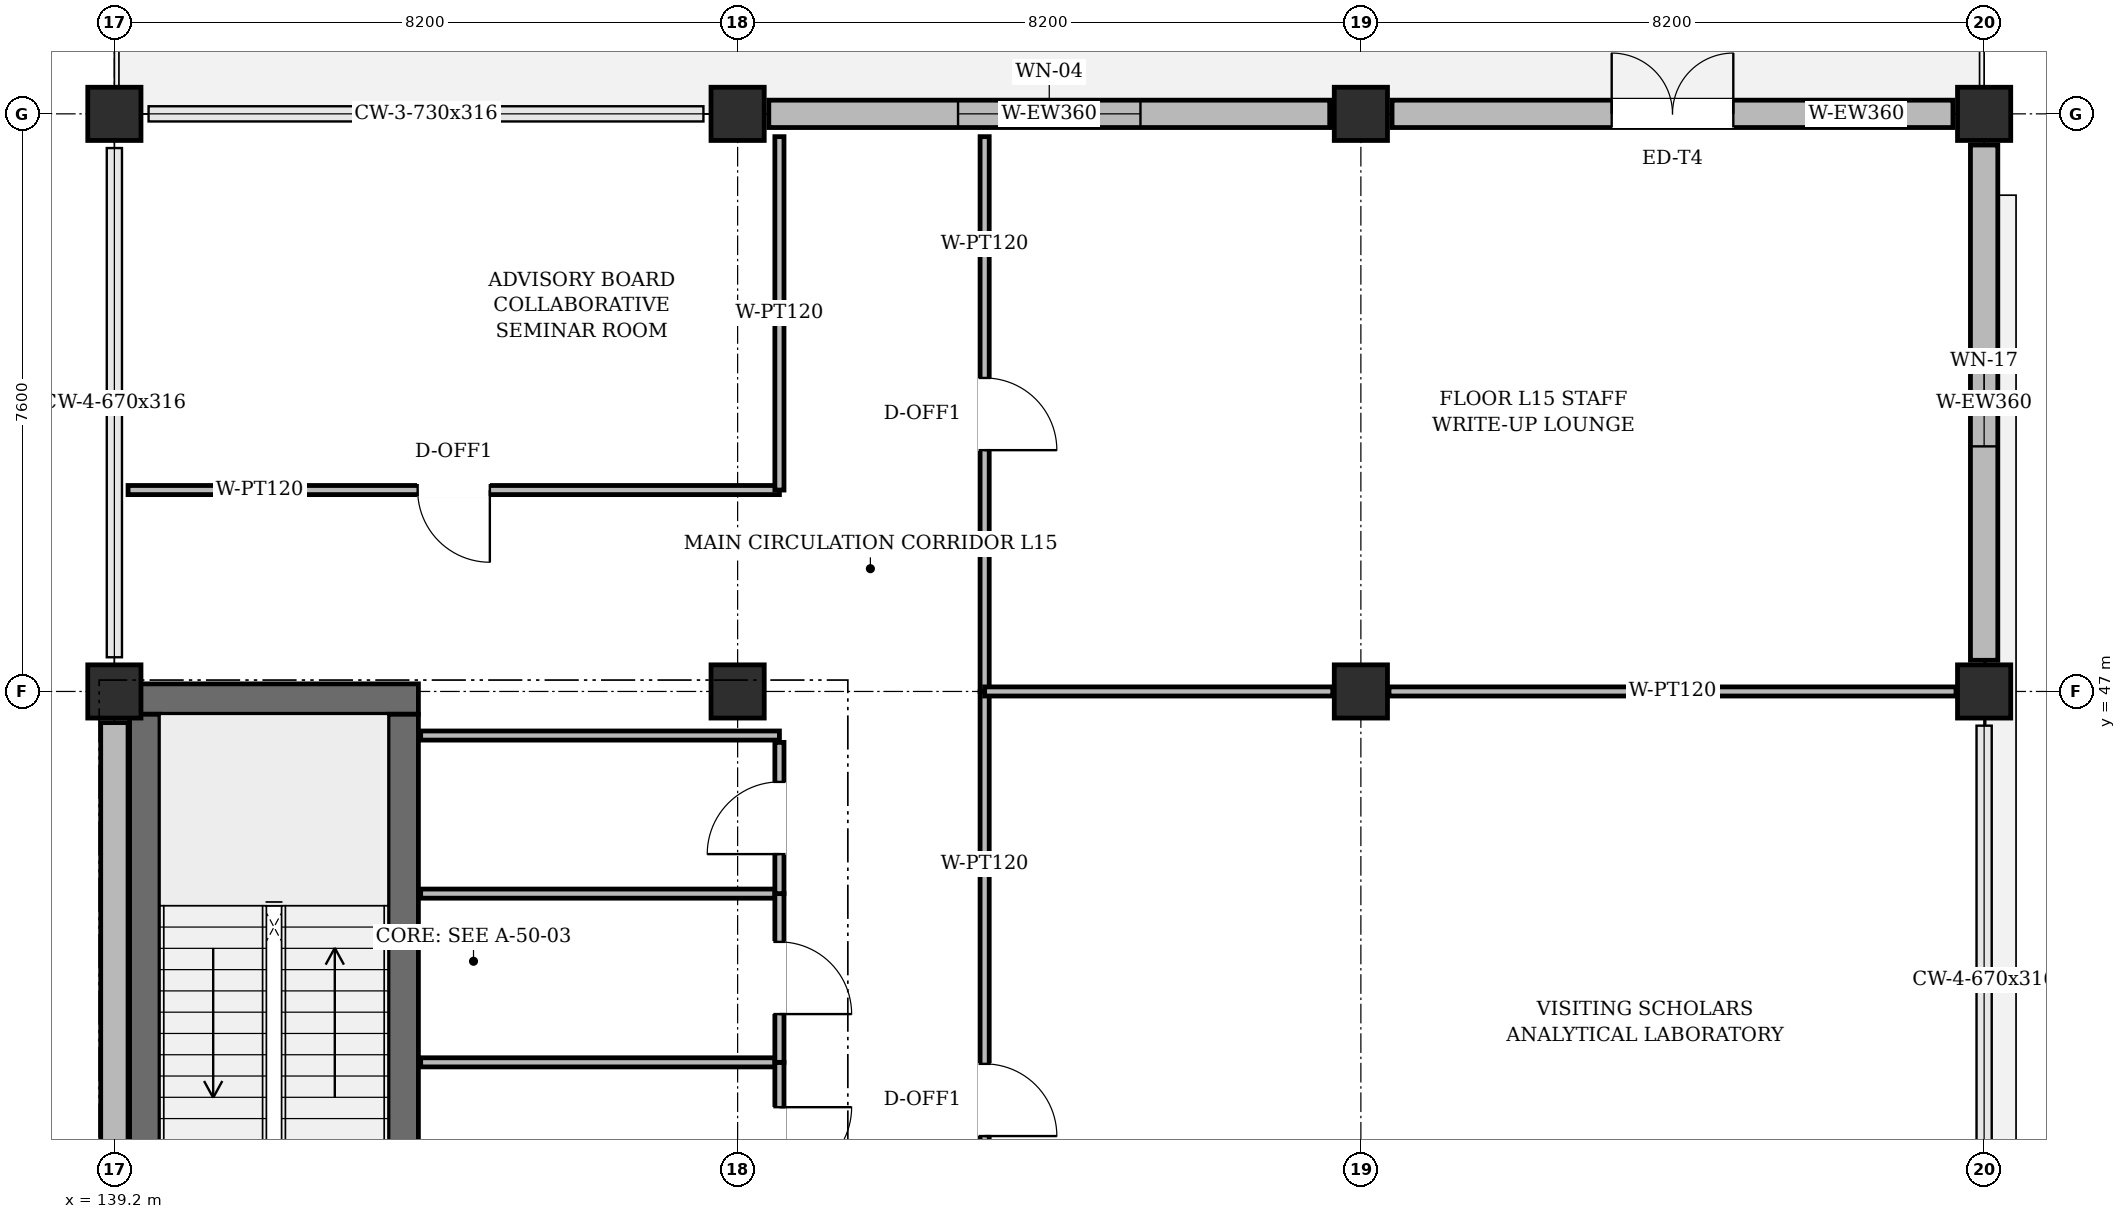
"""IFC4 building model, lengths in metres.
Left out: names, types, materials, properties, quantities, classifications, styles, units other than length and angle.
Written with IfcOpenShell. Run it as: python <this file> out.ifc"""

import sys

from ifc_helpers import new_model, si_unit, direction, frame, frame_2d, origin, origin_2d, place, context, subcontext, project, spatial, rectangle, extrude, element, fill, save


model = new_model("IFC4")
c1 = context("Model", 3, precision=1e-05, world=origin(), true_north=direction((0.0, 1.0)))
c2 = subcontext(c1, "Body", "Model", "MODEL_VIEW")
j1 = project(units=[si_unit("LENGTHUNIT", "METRE"), si_unit("PLANEANGLEUNIT", "RADIAN")], contexts=[c1])
p1 = place(None, origin())
s1 = spatial("IfcSite", under=j1, at=p1, CompositionType="ELEMENT")
p2 = place(p1, origin())
s2 = spatial("IfcBuilding", under=s1, at=p2, CompositionType="ELEMENT")
p3 = place(p2, frame((0.0, 0.0, 66.2)))
s3 = spatial("IfcBuildingStorey", under=s2, at=p3, CompositionType="ELEMENT", Elevation=66.2)
for number, where, z_axis, x_axis in (
    (1, (139.2, 47.0, 0.0), (0.0, 0.0, 1.0), (1.0, 0.0, 0.0)),
    (2, (139.2, 54.6, 0.0), (0.0, 0.0, 1.0), (1.0, 0.0, 0.0)),
    (3, (147.4, 47.0, 0.0), (0.0, 0.0, 1.0), (1.0, 0.0, 0.0)),
    (4, (147.4, 54.6, 0.0), (0.0, 0.0, 1.0), (1.0, 0.0, 0.0)),
    (5, (155.6, 47.0, 0.0), (0.0, 0.0, 1.0), (1.0, 0.0, 0.0)),
    (6, (155.6, 54.6, 0.0), (0.0, 0.0, 1.0), (1.0, 0.0, 0.0)),
    (7, (163.8, 47.0, 0.0), (0.0, 0.0, 1.0), (1.0, 0.0, 0.0)),
    (8, (163.8, 54.6, 0.0), (0.0, 0.0, 1.0), (1.0, 0.0, 0.0)),
):
    element("IfcColumn", number, at=place(p3, frame(where, z_axis=z_axis, x_axis=x_axis)), inside=s3, PredefinedType="COLUMN", context=c2, shape_type="SweptSolid", body=[
        extrude(rectangle(XDim=0.7, YDim=0.7, at=origin_2d()), origin(), (0.0, 0.0, 1.0), 3.76),
    ])
p4 = place(p3, frame((163.8, 47.41, 0.0), z_axis=(0.0, 0.0, 1.0), x_axis=(0.0, 1.0, 0.0)))
e9 = element("IfcWall", 9, at=p4, inside=s3, PredefinedType="SOLIDWALL", context=c2, shape_type="SweptSolid", body=[
    extrude(rectangle(XDim=6.78, YDim=0.36, at=frame_2d((3.39, 0.0))), origin(), (0.0, 0.0, 1.0), 3.145),
])
p5 = place(p4, frame((2.815, 0.0, 0.95)))
e10 = element("IfcOpeningElement", 10, at=p5, cuts=e9, PredefinedType="OPENING", context=c2, shape_type="SweptSolid", body=[
    extrude(rectangle(XDim=1.15, YDim=1.25, at=frame_2d((0.575, 0.625))), frame((0.0, 0.192, 0.0), z_axis=(0.0, -1.0, 0.0), x_axis=(1.0, 0.0, 0.0)), (0.0, 0.0, 1.0), 0.384),
])
p6 = place(p3, frame((163.39, 54.6, 0.0), z_axis=(0.0, 0.0, 1.0), x_axis=(-1.0, 0.0, 0.0)))
e11 = element("IfcWall", 11, at=p6, inside=s3, PredefinedType="SOLIDWALL", context=c2, shape_type="SweptSolid", body=[
    extrude(rectangle(XDim=7.38, YDim=0.36, at=frame_2d((3.69, 0.0))), origin(), (0.0, 0.0, 1.0), 3.145),
])
p7 = place(p6, frame((2.89, 0.0, 0.0)))
e12 = element("IfcOpeningElement", 12, at=p7, cuts=e11, PredefinedType="OPENING", context=c2, shape_type="SweptSolid", body=[
    extrude(rectangle(XDim=1.6, YDim=2.2, at=frame_2d((0.8, 1.1))), frame((0.0, 0.192, 0.0), z_axis=(0.0, -1.0, 0.0), x_axis=(1.0, 0.0, 0.0)), (0.0, 0.0, 1.0), 0.384),
])
p8 = place(p3, frame((155.19, 54.6, 0.0), z_axis=(0.0, 0.0, 1.0), x_axis=(-1.0, 0.0, 0.0)))
e13 = element("IfcWall", 13, at=p8, inside=s3, PredefinedType="SOLIDWALL", context=c2, shape_type="SweptSolid", body=[
    extrude(rectangle(XDim=7.38, YDim=0.36, at=frame_2d((3.69, 0.0))), origin(), (0.0, 0.0, 1.0), 3.145),
])
p9 = place(p8, frame((2.49, 0.0, 0.75)))
e14 = element("IfcOpeningElement", 14, at=p9, cuts=e13, PredefinedType="OPENING", context=c2, shape_type="SweptSolid", body=[
    extrude(rectangle(XDim=2.4, YDim=2.1, at=frame_2d((1.2, 1.05))), frame((0.0, 0.192, 0.0), z_axis=(0.0, -1.0, 0.0), x_axis=(1.0, 0.0, 0.0)), (0.0, 0.0, 1.0), 0.384),
])
p10 = place(p3, frame((139.2, 46.59, 0.0), z_axis=(0.0, 0.0, 1.0), x_axis=(0.0, -1.0, 0.0)))
e15 = element("IfcWall", 15, at=p10, inside=s3, PredefinedType="SOLIDWALL", context=c2, shape_type="SweptSolid", body=[
    extrude(rectangle(XDim=6.78, YDim=0.36, at=frame_2d((3.39, 0.0))), origin(), (0.0, 0.0, 1.0), 3.145),
])
p11 = place(p3, frame((139.4, 46.9, 0.0), z_axis=(0.0, 0.0, 1.0), x_axis=(1.0, 0.0, 0.0)))
e16 = element("IfcWall", 16, at=p11, inside=s3, PredefinedType="SHEAR", context=c2, shape_type="SweptSolid", body=[
    extrude(rectangle(XDim=3.8, YDim=0.4, at=frame_2d((1.9, 0.0))), origin(), (0.0, 0.0, 1.0), 3.76),
])
for number, where, z_axis, x_axis in (
    (17, (139.6, 39.7, 0.0), (0.0, 0.0, 1.0), (0.0, 1.0, 0.0)),
    (18, (143.0, 39.7, 0.0), (0.0, 0.0, 1.0), (0.0, 1.0, 0.0)),
):
    element("IfcWall", number, at=place(p3, frame(where, z_axis=z_axis, x_axis=x_axis)), inside=s3, PredefinedType="SHEAR", context=c2, shape_type="SweptSolid", body=[
        extrude(rectangle(XDim=7.0, YDim=0.4, at=frame_2d((3.5, 0.0))), origin(), (0.0, 0.0, 1.0), 3.76),
    ])
p12 = place(p3, frame((143.23, 46.42, 0.0), z_axis=(0.0, 0.0, 1.0), x_axis=(1.0, 0.0, 0.0)))
e19 = element("IfcWall", 19, at=p12, inside=s3, PredefinedType="PARTITIONING", context=c2, shape_type="SweptSolid", body=[
    extrude(rectangle(XDim=4.72, YDim=0.12, at=frame_2d((2.36, 0.0))), origin(), (0.0, 0.0, 1.0), 3.605),
])
p13 = place(p3, frame((143.23, 42.12, 0.0), z_axis=(0.0, 0.0, 1.0), x_axis=(1.0, 0.0, 0.0)))
e20 = element("IfcWall", 20, at=p13, inside=s3, PredefinedType="PARTITIONING", context=c2, shape_type="SweptSolid", body=[
    extrude(rectangle(XDim=4.72, YDim=0.12, at=frame_2d((2.36, 0.0))), origin(), (0.0, 0.0, 1.0), 3.235),
])
p14 = place(p3, frame((147.95, 42.12, 0.0), z_axis=(0.0, 0.0, 1.0), x_axis=(0.0, -1.0, 0.0)))
e21 = element("IfcWall", 21, at=p14, inside=s3, PredefinedType="PARTITIONING", context=c2, shape_type="SweptSolid", body=[
    extrude(rectangle(XDim=2.13, YDim=0.12, at=frame_2d((1.065, 0.0))), origin(), (0.0, 0.0, 1.0), 3.605),
])
p15 = place(p14, frame((0.59, 0.0, 0.0)))
e22 = element("IfcOpeningElement", 22, at=p15, cuts=e21, PredefinedType="OPENING", context=c2, shape_type="SweptSolid", body=[
    extrude(rectangle(XDim=0.95, YDim=2.15, at=frame_2d((0.475, 1.075))), frame((0.0, 0.072, 0.0), z_axis=(0.0, -1.0, 0.0), x_axis=(1.0, 0.0, 0.0)), (0.0, 0.0, 1.0), 0.144),
])
p16 = place(p3, frame((143.23, 44.34, 0.0), z_axis=(0.0, 0.0, 1.0), x_axis=(1.0, 0.0, 0.0)))
e23 = element("IfcWall", 23, at=p16, inside=s3, PredefinedType="PARTITIONING", context=c2, shape_type="SweptSolid", body=[
    extrude(rectangle(XDim=4.72, YDim=0.12, at=frame_2d((2.36, 0.0))), origin(), (0.0, 0.0, 1.0), 3.185),
])
p17 = place(p3, frame((147.95, 44.34, 0.0), z_axis=(0.0, 0.0, 1.0), x_axis=(0.0, -1.0, 0.0)))
e24 = element("IfcWall", 24, at=p17, inside=s3, PredefinedType="PARTITIONING", context=c2, shape_type="SweptSolid", body=[
    extrude(rectangle(XDim=2.22, YDim=0.12, at=frame_2d((1.11, 0.0))), origin(), (0.0, 0.0, 1.0), 3.605),
])
p18 = place(p17, frame((0.635, 0.0, 0.0)))
e25 = element("IfcOpeningElement", 25, at=p18, cuts=e24, PredefinedType="OPENING", context=c2, shape_type="SweptSolid", body=[
    extrude(rectangle(XDim=0.95, YDim=2.15, at=frame_2d((0.475, 1.075))), frame((0.0, 0.072, 0.0), z_axis=(0.0, -1.0, 0.0), x_axis=(1.0, 0.0, 0.0)), (0.0, 0.0, 1.0), 0.144),
])
p19 = place(p3, frame((147.95, 46.33, 0.0), z_axis=(0.0, 0.0, 1.0), x_axis=(0.0, -1.0, 0.0)))
e26 = element("IfcWall", 26, at=p19, inside=s3, PredefinedType="PARTITIONING", context=c2, shape_type="SweptSolid", body=[
    extrude(rectangle(XDim=1.99, YDim=0.12, at=frame_2d((0.995, 0.0))), origin(), (0.0, 0.0, 1.0), 3.605),
])
p20 = place(p19, frame((0.52, 0.0, 0.0)))
e27 = element("IfcOpeningElement", 27, at=p20, cuts=e26, PredefinedType="OPENING", context=c2, shape_type="SweptSolid", body=[
    extrude(rectangle(XDim=0.95, YDim=2.15, at=frame_2d((0.475, 1.075))), frame((0.0, 0.072, 0.0), z_axis=(0.0, -1.0, 0.0), x_axis=(1.0, 0.0, 0.0)), (0.0, 0.0, 1.0), 0.144),
])
p21 = place(p3, frame((150.65, 47.0, 0.0), z_axis=(0.0, 0.0, 1.0), x_axis=(0.0, -1.0, 0.0)))
e28 = element("IfcWall", 28, at=p21, inside=s3, PredefinedType="PARTITIONING", context=c2, shape_type="SweptSolid", body=[
    extrude(rectangle(XDim=10.75, YDim=0.12, at=frame_2d((5.375, 0.0))), origin(), (0.0, 0.0, 1.0), 3.605),
])
p22 = place(p21, frame((4.9, 0.0, 0.0)))
e29 = element("IfcOpeningElement", 29, at=p22, cuts=e28, PredefinedType="OPENING", context=c2, shape_type="SweptSolid", body=[
    extrude(rectangle(XDim=0.95, YDim=2.2, at=frame_2d((0.475, 1.1))), frame((0.0, 0.072, 0.0), z_axis=(0.0, -1.0, 0.0), x_axis=(1.0, 0.0, 0.0)), (0.0, 0.0, 1.0), 0.144),
])
p23 = place(p3, frame((139.38, 49.65, 0.0), z_axis=(0.0, 0.0, 1.0), x_axis=(1.0, 0.0, 0.0)))
e30 = element("IfcWall", 30, at=p23, inside=s3, PredefinedType="PARTITIONING", context=c2, shape_type="SweptSolid", body=[
    extrude(rectangle(XDim=8.57, YDim=0.12, at=frame_2d((4.285, 0.0))), origin(), (0.0, 0.0, 1.0), 3.185),
])
p24 = place(p23, frame((3.81, 0.0, 0.0)))
e31 = element("IfcOpeningElement", 31, at=p24, cuts=e30, PredefinedType="OPENING", context=c2, shape_type="SweptSolid", body=[
    extrude(rectangle(XDim=0.95, YDim=2.2, at=frame_2d((0.475, 1.1))), frame((0.0, 0.072, 0.0), z_axis=(0.0, -1.0, 0.0), x_axis=(1.0, 0.0, 0.0)), (0.0, 0.0, 1.0), 0.144),
])
p25 = place(p3, frame((147.95, 49.65, 0.0), z_axis=(0.0, 0.0, 1.0), x_axis=(0.0, 1.0, 0.0)))
e32 = element("IfcWall", 32, at=p25, inside=s3, PredefinedType="PARTITIONING", context=c2, shape_type="SweptSolid", body=[
    extrude(rectangle(XDim=4.65, YDim=0.12, at=frame_2d((2.325, 0.0))), origin(), (0.0, 0.0, 1.0), 3.605),
])
p26 = place(p3, frame((150.65, 54.3, 0.0), z_axis=(0.0, 0.0, 1.0), x_axis=(0.0, -1.0, 0.0)))
e33 = element("IfcWall", 33, at=p26, inside=s3, PredefinedType="PARTITIONING", context=c2, shape_type="SweptSolid", body=[
    extrude(rectangle(XDim=7.3, YDim=0.12, at=frame_2d((3.65, 0.0))), origin(), (0.0, 0.0, 1.0), 3.605),
])
p27 = place(p26, frame((3.175, 0.0, 0.0)))
e34 = element("IfcOpeningElement", 34, at=p27, cuts=e33, PredefinedType="OPENING", context=c2, shape_type="SweptSolid", body=[
    extrude(rectangle(XDim=0.95, YDim=2.2, at=frame_2d((0.475, 1.1))), frame((0.0, 0.072, 0.0), z_axis=(0.0, -1.0, 0.0), x_axis=(1.0, 0.0, 0.0)), (0.0, 0.0, 1.0), 0.144),
])
p28 = place(p3, frame((150.65, 47.0, 0.0), z_axis=(0.0, 0.0, 1.0), x_axis=(1.0, 0.0, 0.0)))
e35 = element("IfcWall", 35, at=p28, inside=s3, PredefinedType="PARTITIONING", context=c2, shape_type="SweptSolid", body=[
    extrude(rectangle(XDim=4.58, YDim=0.12, at=frame_2d((2.29, 0.0))), origin(), (0.0, 0.0, 1.0), 3.095),
])
p29 = place(p3, frame((155.97, 47.0, 0.0), z_axis=(0.0, 0.0, 1.0), x_axis=(1.0, 0.0, 0.0)))
e36 = element("IfcWall", 36, at=p29, inside=s3, PredefinedType="PARTITIONING", context=c2, shape_type="SweptSolid", body=[
    extrude(rectangle(XDim=7.46, YDim=0.12, at=frame_2d((3.73, 0.0))), origin(), (0.0, 0.0, 1.0), 3.095),
])
p30 = place(p5, origin())
e37 = element("IfcWindow", 37, at=p30, inside=s3, PartitioningType="SINGLE_PANEL", PredefinedType="WINDOW", context=c2, shape_type="SweptSolid", body=[
    extrude(rectangle(XDim=1.15, YDim=1.25, at=frame_2d((0.575, 0.625))), frame((0.0, 0.03, 0.0), z_axis=(0.0, -1.0, 0.0), x_axis=(1.0, 0.0, 0.0)), (0.0, 0.0, 1.0), 0.06),
])
fill(e10, e37)
p31 = place(p7, frame((1.6, 0.0, 0.0), z_axis=(0.0, 0.0, 1.0), x_axis=(-1.0, 0.0, 0.0)))
e38 = element("IfcDoor", 38, at=p31, inside=s3, OperationType="DOUBLE_DOOR_SINGLE_SWING", PredefinedType="DOOR", context=c2, shape_type="SweptSolid", body=[
    extrude(rectangle(XDim=1.6, YDim=2.2, at=frame_2d((0.8, 1.1))), frame((0.0, 0.025, 0.0), z_axis=(0.0, -1.0, 0.0), x_axis=(1.0, 0.0, 0.0)), (0.0, 0.0, 1.0), 0.05),
])
fill(e12, e38)
p32 = place(p9, origin())
e39 = element("IfcWindow", 39, at=p32, inside=s3, PartitioningType="TRIPLE_PANEL_VERTICAL", PredefinedType="WINDOW", context=c2, shape_type="SweptSolid", body=[
    extrude(rectangle(XDim=2.4, YDim=2.1, at=frame_2d((1.2, 1.05))), frame((0.0, 0.03, 0.0), z_axis=(0.0, -1.0, 0.0), x_axis=(1.0, 0.0, 0.0)), (0.0, 0.0, 1.0), 0.06),
])
fill(e14, e39)
p33 = place(p15, origin())
e40 = element("IfcDoor", 40, at=p33, inside=s3, OperationType="SINGLE_SWING_LEFT", PredefinedType="DOOR", context=c2, shape_type="SweptSolid", body=[
    extrude(rectangle(XDim=0.95, YDim=2.15, at=frame_2d((0.475, 1.075))), frame((0.0, 0.025, 0.0), z_axis=(0.0, -1.0, 0.0), x_axis=(1.0, 0.0, 0.0)), (0.0, 0.0, 1.0), 0.05),
])
fill(e22, e40)
p34 = place(p18, origin())
e41 = element("IfcDoor", 41, at=p34, inside=s3, OperationType="SINGLE_SWING_RIGHT", PredefinedType="DOOR", context=c2, shape_type="SweptSolid", body=[
    extrude(rectangle(XDim=0.95, YDim=2.15, at=frame_2d((0.475, 1.075))), frame((0.0, 0.025, 0.0), z_axis=(0.0, -1.0, 0.0), x_axis=(1.0, 0.0, 0.0)), (0.0, 0.0, 1.0), 0.05),
])
fill(e25, e41)
p35 = place(p20, frame((0.95, 0.0, 0.0), z_axis=(0.0, 0.0, 1.0), x_axis=(-1.0, 0.0, 0.0)))
e42 = element("IfcDoor", 42, at=p35, inside=s3, OperationType="SINGLE_SWING_LEFT", PredefinedType="DOOR", context=c2, shape_type="SweptSolid", body=[
    extrude(rectangle(XDim=0.95, YDim=2.15, at=frame_2d((0.475, 1.075))), frame((0.0, 0.025, 0.0), z_axis=(0.0, -1.0, 0.0), x_axis=(1.0, 0.0, 0.0)), (0.0, 0.0, 1.0), 0.05),
])
fill(e27, e42)
p36 = place(p22, origin())
e43 = element("IfcDoor", 43, at=p36, inside=s3, OperationType="SINGLE_SWING_RIGHT", PredefinedType="DOOR", context=c2, shape_type="SweptSolid", body=[
    extrude(rectangle(XDim=0.95, YDim=2.2, at=frame_2d((0.475, 1.1))), frame((0.0, 0.025, 0.0), z_axis=(0.0, -1.0, 0.0), x_axis=(1.0, 0.0, 0.0)), (0.0, 0.0, 1.0), 0.05),
])
fill(e29, e43)
p37 = place(p24, frame((0.95, 0.0, 0.0), z_axis=(0.0, 0.0, 1.0), x_axis=(-1.0, 0.0, 0.0)))
e44 = element("IfcDoor", 44, at=p37, inside=s3, OperationType="SINGLE_SWING_LEFT", PredefinedType="DOOR", context=c2, shape_type="SweptSolid", body=[
    extrude(rectangle(XDim=0.95, YDim=2.2, at=frame_2d((0.475, 1.1))), frame((0.0, 0.025, 0.0), z_axis=(0.0, -1.0, 0.0), x_axis=(1.0, 0.0, 0.0)), (0.0, 0.0, 1.0), 0.05),
])
fill(e31, e44)
p38 = place(p27, origin())
e45 = element("IfcDoor", 45, at=p38, inside=s3, OperationType="SINGLE_SWING_RIGHT", PredefinedType="DOOR", context=c2, shape_type="SweptSolid", body=[
    extrude(rectangle(XDim=0.95, YDim=2.2, at=frame_2d((0.475, 1.1))), frame((0.0, 0.025, 0.0), z_axis=(0.0, -1.0, 0.0), x_axis=(1.0, 0.0, 0.0)), (0.0, 0.0, 1.0), 0.05),
])
fill(e34, e45)
save(model, sys.argv[1])
